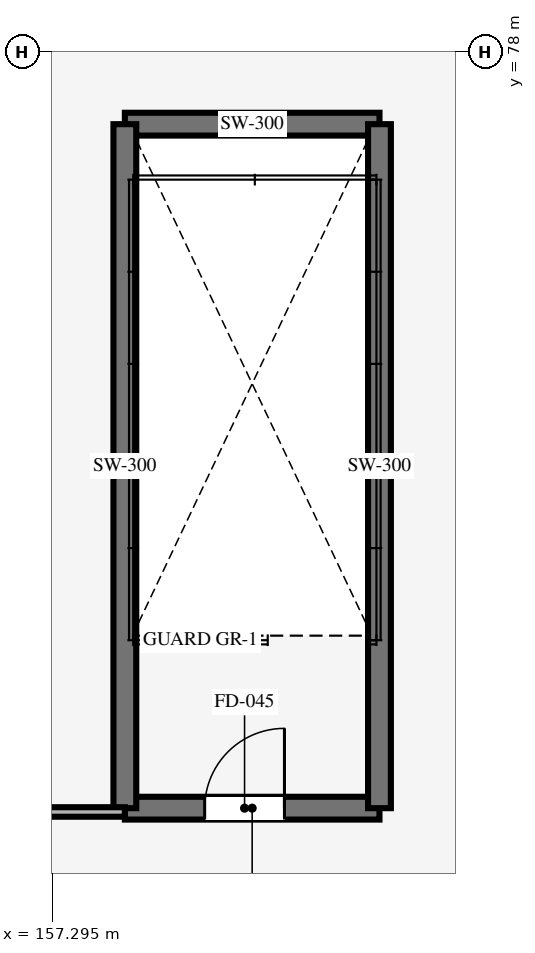
"""IFC4 building model, lengths in metres.
Left out: names, types, materials, properties, quantities, classifications, styles, units other than length and angle.
Written with IfcOpenShell. Run it as: python <this file> out.ifc"""

import sys

from ifc_helpers import new_model, si_unit, direction, frame, frame_2d, origin, place, context, subcontext, project, spatial, rectangle, extrude, element, fill, save


model = new_model("IFC4")
c1 = context("Model", 3, precision=1e-05, world=origin(), true_north=direction((0.0, 1.0)))
c2 = subcontext(c1, "Body", "Model", "MODEL_VIEW")
j1 = project(units=[si_unit("LENGTHUNIT", "METRE"), si_unit("PLANEANGLEUNIT", "RADIAN")], contexts=[c1])
p1 = place(None, origin())
s1 = spatial("IfcSite", under=j1, at=p1, CompositionType="ELEMENT")
p2 = place(p1, origin())
s2 = spatial("IfcBuilding", under=s1, at=p2, CompositionType="ELEMENT")
p3 = place(p2, frame((0.0, 0.0, 15.0)))
s3 = spatial("IfcBuildingStorey", under=s2, at=p3, CompositionType="ELEMENT", Elevation=15.0)
p4 = place(p3, frame((158.25, 68.05, 0.0), z_axis=(0.0, 0.0, 1.0), x_axis=(1.0, 0.0, 0.0)))
e1 = element("IfcWall", 1, at=p4, inside=s3, PredefinedType="SHEAR", context=c2, shape_type="SweptSolid", body=[
    extrude(rectangle(XDim=3.35, YDim=0.3, at=frame_2d((1.675, 0.0))), origin(), (0.0, 0.0, 1.0), 4.48),
])
p5 = place(p4, frame((1.05, 0.0, 0.0)))
e2 = element("IfcOpeningElement", 2, at=p5, cuts=e1, PredefinedType="OPENING", context=c2, shape_type="SweptSolid", body=[
    extrude(rectangle(XDim=1.05, YDim=2.15, at=frame_2d((0.525, 1.075))), frame((0.0, 0.16, 0.0), z_axis=(0.0, -1.0, 0.0), x_axis=(1.0, 0.0, 0.0)), (0.0, 0.0, 1.0), 0.32),
])
p6 = place(p3, frame((158.25, 77.05, 0.0), z_axis=(0.0, 0.0, 1.0), x_axis=(1.0, 0.0, 0.0)))
e3 = element("IfcWall", 3, at=p6, inside=s3, PredefinedType="SHEAR", context=c2, shape_type="SweptSolid", body=[
    extrude(rectangle(XDim=3.35, YDim=0.3, at=frame_2d((1.675, 0.0))), origin(), (0.0, 0.0, 1.0), 4.48),
])
for number, where, z_axis, x_axis in (
    (4, (158.25, 68.05, 0.0), (0.0, 0.0, 1.0), (0.0, 1.0, 0.0)),
    (5, (161.6, 68.05, 0.0), (0.0, 0.0, 1.0), (0.0, 1.0, 0.0)),
):
    element("IfcWall", number, at=place(p3, frame(where, z_axis=z_axis, x_axis=x_axis)), inside=s3, PredefinedType="SHEAR", context=c2, shape_type="SweptSolid", body=[
        extrude(rectangle(XDim=9.0, YDim=0.3, at=frame_2d((4.5, 0.0))), origin(), (0.0, 0.0, 1.0), 4.48),
    ])
p7 = place(p3, frame((148.0, 68.0, 0.0), z_axis=(0.0, 0.0, 1.0), x_axis=(1.0, 0.0, 0.0)))
e6 = element("IfcWall", 6, at=p7, inside=s3, PredefinedType="PARTITIONING", context=c2, shape_type="SweptSolid", body=[
    extrude(rectangle(XDim=10.25, YDim=0.125, at=frame_2d((5.125, 0.0))), origin(), (0.0, 0.0, 1.0), 3.45),
])
p8 = place(p7, frame((4.5, 0.0, 0.0)))
e7 = element("IfcOpeningElement", 7, at=p8, cuts=e6, PredefinedType="OPENING", context=c2, shape_type="SweptSolid", body=[
    extrude(rectangle(XDim=0.95, YDim=2.1, at=frame_2d((0.475, 1.05))), frame((0.0, 0.073, 0.0), z_axis=(0.0, -1.0, 0.0), x_axis=(1.0, 0.0, 0.0)), (0.0, 0.0, 1.0), 0.145),
])
p9 = place(p5, origin())
e8 = element("IfcDoor", 8, at=p9, inside=s3, OperationType="SINGLE_SWING_RIGHT", PredefinedType="DOOR", context=c2, shape_type="SweptSolid", body=[
    extrude(rectangle(XDim=1.05, YDim=2.15, at=frame_2d((0.525, 1.075))), frame((0.0, 0.025, 0.0), z_axis=(0.0, -1.0, 0.0), x_axis=(1.0, 0.0, 0.0)), (0.0, 0.0, 1.0), 0.05),
])
fill(e2, e8)
save(model, sys.argv[1])
